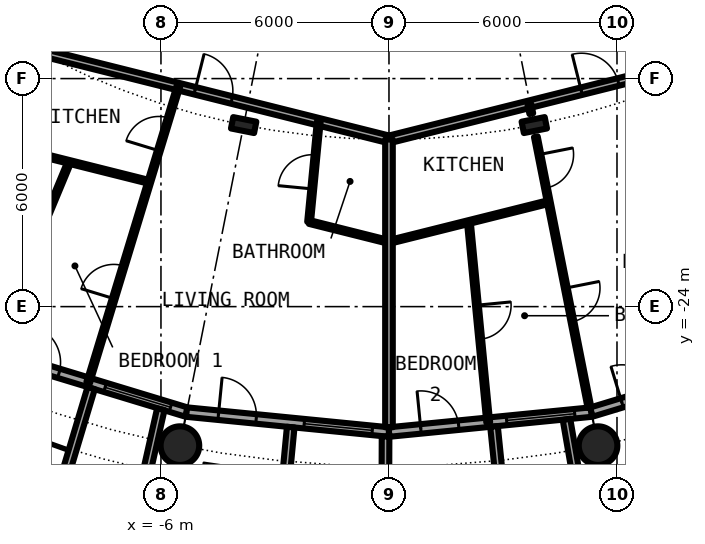
"""IFC4 building model, lengths in metres.
Left out: names, types, materials, properties, quantities, classifications, styles, units other than length and angle.
Written with IfcOpenShell. Run it as: python <this file> out.ifc"""

import sys

from ifc_helpers import new_model, si_unit, direction, frame, frame_2d, origin, origin_2d, place, context, subcontext, project, spatial, rectangle, hollow_circle, i_section, extrude, element, fill, save


model = new_model("IFC4")
c1 = context("Model", 3, precision=1e-05, world=origin(), true_north=direction((0.0, 1.0)))
c2 = subcontext(c1, "Body", "Model", "MODEL_VIEW")
j1 = project(units=[si_unit("LENGTHUNIT", "METRE"), si_unit("PLANEANGLEUNIT", "RADIAN")], contexts=[c1])
p1 = place(None, origin())
s1 = spatial("IfcSite", under=j1, at=p1, CompositionType="ELEMENT")
p2 = place(p1, origin())
s2 = spatial("IfcBuilding", under=s1, at=p2, CompositionType="ELEMENT")
p3 = place(p2, frame((0.0, 0.0, 31.95)))
s3 = spatial("IfcBuildingStorey", under=s2, at=p3, CompositionType="ELEMENT", Elevation=31.95)
for number, where, z_axis, x_axis in (
    (1, (-5.501, -27.658, 0.0), (0.0, 0.0, 1.0), (1.0, 0.0, 0.0)),
    (2, (5.501, -27.658, 0.0), (0.0, 0.0, 1.0), (1.0, 0.0, 0.0)),
):
    element("IfcColumn", number, at=place(p3, frame(where, z_axis=z_axis, x_axis=x_axis)), inside=s3, PredefinedType="COLUMN", context=c2, shape_type="SweptSolid", body=[
        extrude(hollow_circle(Radius=0.508, WallThickness=0.05, at=origin_2d()), origin(), (0.0, 0.0, 1.0), 3.05),
    ])
for number, where, z_axis, x_axis in (
    (3, (-3.824, -19.223, 0.0), (0.0, 0.0, 1.0), (-0.195, -0.981, 0.0)),
    (4, (3.824, -19.223, 0.0), (0.0, 0.0, 1.0), (0.195, -0.981, 0.0)),
):
    element("IfcColumn", number, at=place(p3, frame(where, z_axis=z_axis, x_axis=x_axis)), inside=s3, PredefinedType="COLUMN", context=c2, shape_type="SweptSolid", body=[
        extrude(i_section(OverallWidth=0.305, OverallDepth=0.62, WebThickness=0.021, FlangeThickness=0.04, FilletRadius=0.027, at=origin_2d()), origin(), (0.0, 0.0, 1.0), 3.05),
    ])
p4 = place(p3, frame((-10.447, -25.222, 0.0), z_axis=(0.0, 0.0, 1.0), x_axis=(0.956965678721, -0.290201119486, 0.0)))
e5 = element("IfcWall", 5, at=p4, inside=s3, PredefinedType="SOLIDWALL", context=c2, shape_type="SweptSolid", body=[
    extrude(rectangle(XDim=5.351, YDim=0.25, at=frame_2d((2.676, 0.0))), origin(), (0.0, 0.0, 1.0), 2.7),
])
p5 = place(p4, frame((0.841, 0.0, 0.0)))
e6 = element("IfcOpeningElement", 6, at=p5, cuts=e5, PredefinedType="OPENING", context=c2, shape_type="SweptSolid", body=[
    extrude(rectangle(XDim=1.0, YDim=2.2, at=frame_2d((0.5, 1.1))), frame((0.0, 0.135, 0.0), z_axis=(0.0, -1.0, 0.0), x_axis=(1.0, 0.0, 0.0)), (0.0, 0.0, 1.0), 0.27),
])
p6 = place(p4, frame((3.111, 0.0, 0.3)))
e7 = element("IfcOpeningElement", 7, at=p6, cuts=e5, PredefinedType="OPENING", context=c2, shape_type="SweptSolid", body=[
    extrude(rectangle(XDim=1.8, YDim=2.1, at=frame_2d((0.9, 1.05))), frame((0.0, 0.135, 0.0), z_axis=(0.0, -1.0, 0.0), x_axis=(1.0, 0.0, 0.0)), (0.0, 0.0, 1.0), 0.27),
])
p7 = place(p3, frame((-7.837, -26.144, -0.03), z_axis=(0.0, 0.0, 1.0), x_axis=(-0.287064767992, -0.957911174889, 0.0)))
e8 = element("IfcWall", 8, at=p7, inside=s3, PredefinedType="SOLIDWALL", context=c2, shape_type="SweptSolid", body=[
    extrude(rectangle(XDim=3.006, YDim=0.2, at=frame_2d((1.503, 0.0))), origin(), (0.0, 0.0, 1.0), 2.73),
])
p8 = place(p3, frame((-6.004, -26.7, -0.03), z_axis=(0.0, 0.0, 1.0), x_axis=(-0.219609259383, -0.975587911566, 0.0)))
e9 = element("IfcWall", 9, at=p8, inside=s3, PredefinedType="SOLIDWALL", context=c2, shape_type="SweptSolid", body=[
    extrude(rectangle(XDim=2.933, YDim=0.2, at=frame_2d((1.466, 0.0))), origin(), (0.0, 0.0, 1.0), 2.73),
])
p9 = place(p3, frame((-5.326, -26.775, 0.0), z_axis=(0.0, 0.0, 1.0), x_axis=(0.995173996315, -0.098126026407, 0.0)))
e10 = element("IfcWall", 10, at=p9, inside=s3, PredefinedType="SOLIDWALL", context=c2, shape_type="SweptSolid", body=[
    extrude(rectangle(XDim=5.352, YDim=0.25, at=frame_2d((2.676, 0.0))), origin(), (0.0, 0.0, 1.0), 2.7),
])
p10 = place(p9, frame((0.841, 0.0, 0.0)))
e11 = element("IfcOpeningElement", 11, at=p10, cuts=e10, PredefinedType="OPENING", context=c2, shape_type="SweptSolid", body=[
    extrude(rectangle(XDim=1.0, YDim=2.2, at=frame_2d((0.5, 1.1))), frame((0.0, 0.135, 0.0), z_axis=(0.0, -1.0, 0.0), x_axis=(1.0, 0.0, 0.0)), (0.0, 0.0, 1.0), 0.27),
])
p11 = place(p9, frame((3.111, 0.0, 0.3)))
e12 = element("IfcOpeningElement", 12, at=p11, cuts=e10, PredefinedType="OPENING", context=c2, shape_type="SweptSolid", body=[
    extrude(rectangle(XDim=1.8, YDim=2.1, at=frame_2d((0.9, 1.05))), frame((0.0, 0.135, 0.0), z_axis=(0.0, -1.0, 0.0), x_axis=(1.0, 0.0, 0.0)), (0.0, 0.0, 1.0), 0.27),
])
p12 = place(p3, frame((-2.586, -27.171, -0.03), z_axis=(0.0, 0.0, 1.0), x_axis=(-0.094548432284, -0.995520262954, 0.0)))
e13 = element("IfcWall", 13, at=p12, inside=s3, PredefinedType="SOLIDWALL", context=c2, shape_type="SweptSolid", body=[
    extrude(rectangle(XDim=3.006, YDim=0.2, at=frame_2d((1.503, 0.0))), origin(), (0.0, 0.0, 1.0), 2.73),
])
p13 = place(p3, frame((-0.09, -27.417, -0.03), z_axis=(0.0, 0.0, 1.0), x_axis=(-0.00347308367, -0.999993968827, 0.0)))
e14 = element("IfcWall", 14, at=p13, inside=s3, PredefinedType="SOLIDWALL", context=c2, shape_type="SweptSolid", body=[
    extrude(rectangle(XDim=2.882, YDim=0.2, at=frame_2d((1.441, 0.0))), origin(), (0.0, 0.0, 1.0), 2.73),
])
p14 = place(p3, frame((0.0, -27.3, 0.0), z_axis=(0.0, 0.0, 1.0), x_axis=(0.995173996315, 0.098126026407, 0.0)))
e15 = element("IfcWall", 15, at=p14, inside=s3, PredefinedType="SOLIDWALL", context=c2, shape_type="SweptSolid", body=[
    extrude(rectangle(XDim=5.352, YDim=0.25, at=frame_2d((2.676, 0.0))), origin(), (0.0, 0.0, 1.0), 2.7),
])
p15 = place(p14, frame((0.841, 0.0, 0.0)))
e16 = element("IfcOpeningElement", 16, at=p15, cuts=e15, PredefinedType="OPENING", context=c2, shape_type="SweptSolid", body=[
    extrude(rectangle(XDim=1.0, YDim=2.2, at=frame_2d((0.5, 1.1))), frame((0.0, 0.135, 0.0), z_axis=(0.0, -1.0, 0.0), x_axis=(1.0, 0.0, 0.0)), (0.0, 0.0, 1.0), 0.27),
])
p16 = place(p14, frame((3.111, 0.0, 0.3)))
e17 = element("IfcOpeningElement", 17, at=p16, cuts=e15, PredefinedType="OPENING", context=c2, shape_type="SweptSolid", body=[
    extrude(rectangle(XDim=1.8, YDim=2.1, at=frame_2d((0.9, 1.05))), frame((0.0, 0.135, 0.0), z_axis=(0.0, -1.0, 0.0), x_axis=(1.0, 0.0, 0.0)), (0.0, 0.0, 1.0), 0.27),
])
p17 = place(p3, frame((2.764, -27.153, -0.03), z_axis=(0.0, 0.0, 1.0), x_axis=(0.101505487237, -0.994834979311, 0.0)))
e18 = element("IfcWall", 18, at=p17, inside=s3, PredefinedType="SOLIDWALL", context=c2, shape_type="SweptSolid", body=[
    extrude(rectangle(XDim=3.007, YDim=0.2, at=frame_2d((1.503, 0.0))), origin(), (0.0, 0.0, 1.0), 2.73),
])
p18 = place(p3, frame((4.671, -26.966, -0.03), z_axis=(0.0, 0.0, 1.0), x_axis=(0.170539878907, -0.985350774954, 0.0)))
e19 = element("IfcWall", 19, at=p18, inside=s3, PredefinedType="SOLIDWALL", context=c2, shape_type="SweptSolid", body=[
    extrude(rectangle(XDim=2.932, YDim=0.2, at=frame_2d((1.466, 0.0))), origin(), (0.0, 0.0, 1.0), 2.73),
])
p19 = place(p3, frame((5.326, -26.775, 0.0), z_axis=(0.0, 0.0, 1.0), x_axis=(0.956965678721, 0.290201119486, 0.0)))
e20 = element("IfcWall", 20, at=p19, inside=s3, PredefinedType="SOLIDWALL", context=c2, shape_type="SweptSolid", body=[
    extrude(rectangle(XDim=5.351, YDim=0.25, at=frame_2d((2.676, 0.0))), origin(), (0.0, 0.0, 1.0), 2.7),
])
p20 = place(p19, frame((0.841, 0.0, 0.0)))
e21 = element("IfcOpeningElement", 21, at=p20, cuts=e20, PredefinedType="OPENING", context=c2, shape_type="SweptSolid", body=[
    extrude(rectangle(XDim=1.0, YDim=2.2, at=frame_2d((0.5, 1.1))), frame((0.0, 0.135, 0.0), z_axis=(0.0, -1.0, 0.0), x_axis=(1.0, 0.0, 0.0)), (0.0, 0.0, 1.0), 0.27),
])
p21 = place(p19, frame((3.111, 0.0, 0.3)))
e22 = element("IfcOpeningElement", 22, at=p21, cuts=e20, PredefinedType="OPENING", context=c2, shape_type="SweptSolid", body=[
    extrude(rectangle(XDim=1.8, YDim=2.1, at=frame_2d((0.9, 1.05))), frame((0.0, 0.135, 0.0), z_axis=(0.0, -1.0, 0.0), x_axis=(1.0, 0.0, 0.0)), (0.0, 0.0, 1.0), 0.27),
])
p22 = place(p3, frame((-10.516, -19.666, 0.0), z_axis=(0.0, 0.0, 1.0), x_axis=(0.97005315629, -0.242892721118, 0.0)))
e23 = element("IfcWall", 23, at=p22, inside=s3, PredefinedType="PARTITIONING", context=c2, shape_type="SweptSolid", body=[
    extrude(rectangle(XDim=4.343, YDim=0.1, at=frame_2d((2.172, 0.0))), origin(), (0.0, 0.0, 1.0), 2.7),
])
p23 = place(p3, frame((-2.096, -21.774, 0.0), z_axis=(0.0, 0.0, 1.0), x_axis=(0.969969957613, -0.24322475476, 0.0)))
e24 = element("IfcWall", 24, at=p23, inside=s3, PredefinedType="PARTITIONING", context=c2, shape_type="SweptSolid", body=[
    extrude(rectangle(XDim=2.167, YDim=0.1, at=frame_2d((1.083, 0.0))), origin(), (0.0, 0.0, 1.0), 2.7),
])
p24 = place(p3, frame((-0.006, -22.301, 0.0), z_axis=(0.0, 0.0, 1.0), x_axis=(0.970106148391, 0.24268098577, 0.0)))
e25 = element("IfcWall", 25, at=p24, inside=s3, PredefinedType="PARTITIONING", context=c2, shape_type="SweptSolid", body=[
    extrude(rectangle(XDim=4.347, YDim=0.1, at=frame_2d((2.173, 0.0))), origin(), (0.0, 0.0, 1.0), 2.7),
])
p25 = place(p3, frame((-9.242, -17.284, 0.0), z_axis=(0.0, 0.0, 1.0), x_axis=(0.970002158938, -0.243096301198, 0.0)))
e26 = element("IfcWall", 26, at=p25, inside=s3, PredefinedType="PARTITIONING", context=c2, shape_type="SweptSolid", body=[
    extrude(rectangle(XDim=9.528, YDim=0.2, at=frame_2d((4.764, 0.0))), origin(), (0.0, 0.0, 1.0), 2.38),
])
p26 = place(p25, frame((4.262, 0.0, 0.0)))
e27 = element("IfcOpeningElement", 27, at=p26, cuts=e26, PredefinedType="OPENING", context=c2, shape_type="SweptSolid", body=[
    extrude(rectangle(XDim=1.0, YDim=2.3, at=frame_2d((0.5, 1.15))), frame((0.0, 0.11, 0.0), z_axis=(0.0, -1.0, 0.0), x_axis=(1.0, 0.0, 0.0)), (0.0, 0.0, 1.0), 0.22),
])
p27 = place(p3, frame((-0.001, -19.601, 0.0), z_axis=(0.0, 0.0, 1.0), x_axis=(0.970014215304, 0.243048188859, 0.0)))
e28 = element("IfcWall", 28, at=p27, inside=s3, PredefinedType="PARTITIONING", context=c2, shape_type="SweptSolid", body=[
    extrude(rectangle(XDim=9.526, YDim=0.2, at=frame_2d((4.763, 0.0))), origin(), (0.0, 0.0, 1.0), 2.38),
])
p28 = place(p27, frame((5.221, 0.0, 0.0)))
e29 = element("IfcOpeningElement", 29, at=p28, cuts=e28, PredefinedType="OPENING", context=c2, shape_type="SweptSolid", body=[
    extrude(rectangle(XDim=1.0, YDim=2.3, at=frame_2d((0.5, 1.15))), frame((0.0, 0.11, 0.0), z_axis=(0.0, -1.0, 0.0), x_axis=(1.0, 0.0, 0.0)), (0.0, 0.0, 1.0), 0.22),
])
p29 = place(p3, frame((-10.447, -25.086, 0.0), z_axis=(0.0, 0.0, 1.0), x_axis=(0.384363513821, 0.923181828917, 0.0)))
e30 = element("IfcWall", 30, at=p29, inside=s3, PredefinedType="PARTITIONING", context=c2, shape_type="SweptSolid", body=[
    extrude(rectangle(XDim=5.3, YDim=0.1, at=frame_2d((2.65, 0.0))), origin(), (0.0, 0.0, 1.0), 2.7),
])
p30 = place(p29, frame((2.2, 0.0, 0.0)))
e31 = element("IfcOpeningElement", 31, at=p30, cuts=e30, PredefinedType="OPENING", context=c2, shape_type="SweptSolid", body=[
    extrude(rectangle(XDim=0.9, YDim=2.3, at=frame_2d((0.45, 1.15))), frame((0.0, 0.06, 0.0), z_axis=(0.0, -1.0, 0.0), x_axis=(1.0, 0.0, 0.0)), (0.0, 0.0, 1.0), 0.12),
])
p31 = place(p3, frame((-7.914, -25.997, 0.0), z_axis=(0.0, 0.0, 1.0), x_axis=(0.291319167605, 0.956625915698, 0.0)))
e32 = element("IfcWall", 32, at=p31, inside=s3, PredefinedType="PARTITIONING", context=c2, shape_type="SweptSolid", body=[
    extrude(rectangle(XDim=8.139, YDim=0.1, at=frame_2d((4.07, 0.0))), origin(), (0.0, 0.0, 1.0), 2.7),
])
p32 = place(p31, frame((6.377, 0.0, 0.0)))
e33 = element("IfcOpeningElement", 33, at=p32, cuts=e32, PredefinedType="OPENING", context=c2, shape_type="SweptSolid", body=[
    extrude(rectangle(XDim=0.9, YDim=2.3, at=frame_2d((0.45, 1.15))), frame((0.0, 0.06, 0.0), z_axis=(0.0, -1.0, 0.0), x_axis=(1.0, 0.0, 0.0)), (0.0, 0.0, 1.0), 0.12),
])
p33 = place(p31, frame((2.308, 0.0, 0.0)))
e34 = element("IfcOpeningElement", 34, at=p33, cuts=e32, PredefinedType="OPENING", context=c2, shape_type="SweptSolid", body=[
    extrude(rectangle(XDim=0.9, YDim=2.3, at=frame_2d((0.45, 1.15))), frame((0.0, 0.06, 0.0), z_axis=(0.0, -1.0, 0.0), x_axis=(1.0, 0.0, 0.0)), (0.0, 0.0, 1.0), 0.12),
])
p34 = place(p3, frame((-2.102, -21.773, 0.0), z_axis=(0.0, 0.0, 1.0), x_axis=(0.095970632278, 0.995384165908, 0.0)))
e35 = element("IfcWall", 35, at=p34, inside=s3, PredefinedType="PARTITIONING", context=c2, shape_type="SweptSolid", body=[
    extrude(rectangle(XDim=2.648, YDim=0.1, at=frame_2d((1.324, 0.0))), origin(), (0.0, 0.0, 1.0), 2.7),
])
p35 = place(p34, frame((0.874, 0.0, 0.0)))
e36 = element("IfcOpeningElement", 36, at=p35, cuts=e35, PredefinedType="OPENING", context=c2, shape_type="SweptSolid", body=[
    extrude(rectangle(XDim=0.9, YDim=2.3, at=frame_2d((0.45, 1.15))), frame((0.0, 0.06, 0.0), z_axis=(0.0, -1.0, 0.0), x_axis=(1.0, 0.0, 0.0)), (0.0, 0.0, 1.0), 0.12),
])
p36 = place(p3, frame((0.0, -27.175, 0.0), z_axis=(0.0, 0.0, 1.0), x_axis=(0.0, 1.0, 0.0)))
e37 = element("IfcWall", 37, at=p36, inside=s3, PredefinedType="PARTITIONING", context=c2, shape_type="SweptSolid", body=[
    extrude(rectangle(XDim=7.575, YDim=0.2, at=frame_2d((3.788, 0.0))), origin(), (0.0, 0.0, 1.0), 2.7),
])
p37 = place(p3, frame((2.102, -21.773, 0.0), z_axis=(0.0, 0.0, 1.0), x_axis=(0.096215269366, -0.995360548716, 0.0)))
e38 = element("IfcWall", 38, at=p37, inside=s3, PredefinedType="PARTITIONING", context=c2, shape_type="SweptSolid", body=[
    extrude(rectangle(XDim=5.301, YDim=0.1, at=frame_2d((2.65, 0.0))), origin(), (0.0, 0.0, 1.0), 2.7),
])
p38 = place(p37, frame((2.2, 0.0, 0.0)))
e39 = element("IfcOpeningElement", 39, at=p38, cuts=e38, PredefinedType="OPENING", context=c2, shape_type="SweptSolid", body=[
    extrude(rectangle(XDim=0.9, YDim=2.3, at=frame_2d((0.45, 1.15))), frame((0.0, 0.06, 0.0), z_axis=(0.0, -1.0, 0.0), x_axis=(1.0, 0.0, 0.0)), (0.0, 0.0, 1.0), 0.12),
])
p39 = place(p3, frame((3.695, -18.674, 0.0), z_axis=(0.0, 0.0, 1.0), x_axis=(0.197040251839, -0.980395399395, 0.0)))
e40 = element("IfcWall", 40, at=p39, inside=s3, PredefinedType="PARTITIONING", context=c2, shape_type="SweptSolid", body=[
    extrude(rectangle(XDim=0.254, YDim=0.1, at=frame_2d((0.127, 0.0))), origin(), (0.0, 0.0, 1.0), 2.7),
])
p40 = place(p3, frame((3.865, -19.531, 0.0), z_axis=(0.0, 0.0, 1.0), x_axis=(0.194196464481, -0.980962656365, 0.0)))
e41 = element("IfcWall", 41, at=p40, inside=s3, PredefinedType="PARTITIONING", context=c2, shape_type="SweptSolid", body=[
    extrude(rectangle(XDim=7.265, YDim=0.1, at=frame_2d((3.633, 0.0))), origin(), (0.0, 0.0, 1.0), 2.7),
])
p41 = place(p40, frame((0.476, 0.0, 0.0)))
e42 = element("IfcOpeningElement", 42, at=p41, cuts=e41, PredefinedType="OPENING", context=c2, shape_type="SweptSolid", body=[
    extrude(rectangle(XDim=0.9, YDim=2.3, at=frame_2d((0.45, 1.15))), frame((0.0, 0.06, 0.0), z_axis=(0.0, -1.0, 0.0), x_axis=(1.0, 0.0, 0.0)), (0.0, 0.0, 1.0), 0.12),
])
p42 = place(p40, frame((4.058, 0.0, 0.0)))
e43 = element("IfcOpeningElement", 43, at=p42, cuts=e41, PredefinedType="OPENING", context=c2, shape_type="SweptSolid", body=[
    extrude(rectangle(XDim=0.9, YDim=2.3, at=frame_2d((0.45, 1.15))), frame((0.0, 0.06, 0.0), z_axis=(0.0, -1.0, 0.0), x_axis=(1.0, 0.0, 0.0)), (0.0, 0.0, 1.0), 0.12),
])
p43 = place(p5, origin())
e44 = element("IfcDoor", 44, at=p43, inside=s3, OperationType="SINGLE_SWING_LEFT", PredefinedType="DOOR", context=c2, shape_type="SweptSolid", body=[
    extrude(rectangle(XDim=1.0, YDim=2.2, at=frame_2d((0.5, 1.1))), frame((0.0, 0.025, 0.0), z_axis=(0.0, -1.0, 0.0), x_axis=(1.0, 0.0, 0.0)), (0.0, 0.0, 1.0), 0.05),
])
fill(e6, e44)
p44 = place(p6, origin())
e45 = element("IfcWindow", 45, at=p44, inside=s3, PartitioningType="SINGLE_PANEL", PredefinedType="WINDOW", context=c2, shape_type="SweptSolid", body=[
    extrude(rectangle(XDim=1.8, YDim=2.1, at=frame_2d((0.9, 1.05))), frame((0.0, 0.03, 0.0), z_axis=(0.0, -1.0, 0.0), x_axis=(1.0, 0.0, 0.0)), (0.0, 0.0, 1.0), 0.06),
])
fill(e7, e45)
p45 = place(p10, origin())
e46 = element("IfcDoor", 46, at=p45, inside=s3, OperationType="SINGLE_SWING_LEFT", PredefinedType="DOOR", context=c2, shape_type="SweptSolid", body=[
    extrude(rectangle(XDim=1.0, YDim=2.2, at=frame_2d((0.5, 1.1))), frame((0.0, 0.025, 0.0), z_axis=(0.0, -1.0, 0.0), x_axis=(1.0, 0.0, 0.0)), (0.0, 0.0, 1.0), 0.05),
])
fill(e11, e46)
p46 = place(p11, origin())
e47 = element("IfcWindow", 47, at=p46, inside=s3, PartitioningType="SINGLE_PANEL", PredefinedType="WINDOW", context=c2, shape_type="SweptSolid", body=[
    extrude(rectangle(XDim=1.8, YDim=2.1, at=frame_2d((0.9, 1.05))), frame((0.0, 0.03, 0.0), z_axis=(0.0, -1.0, 0.0), x_axis=(1.0, 0.0, 0.0)), (0.0, 0.0, 1.0), 0.06),
])
fill(e12, e47)
p47 = place(p15, origin())
e48 = element("IfcDoor", 48, at=p47, inside=s3, OperationType="SINGLE_SWING_LEFT", PredefinedType="DOOR", context=c2, shape_type="SweptSolid", body=[
    extrude(rectangle(XDim=1.0, YDim=2.2, at=frame_2d((0.5, 1.1))), frame((0.0, 0.025, 0.0), z_axis=(0.0, -1.0, 0.0), x_axis=(1.0, 0.0, 0.0)), (0.0, 0.0, 1.0), 0.05),
])
fill(e16, e48)
p48 = place(p16, origin())
e49 = element("IfcWindow", 49, at=p48, inside=s3, PartitioningType="SINGLE_PANEL", PredefinedType="WINDOW", context=c2, shape_type="SweptSolid", body=[
    extrude(rectangle(XDim=1.8, YDim=2.1, at=frame_2d((0.9, 1.05))), frame((0.0, 0.03, 0.0), z_axis=(0.0, -1.0, 0.0), x_axis=(1.0, 0.0, 0.0)), (0.0, 0.0, 1.0), 0.06),
])
fill(e17, e49)
p49 = place(p20, origin())
e50 = element("IfcDoor", 50, at=p49, inside=s3, OperationType="SINGLE_SWING_LEFT", PredefinedType="DOOR", context=c2, shape_type="SweptSolid", body=[
    extrude(rectangle(XDim=1.0, YDim=2.2, at=frame_2d((0.5, 1.1))), frame((0.0, 0.025, 0.0), z_axis=(0.0, -1.0, 0.0), x_axis=(1.0, 0.0, 0.0)), (0.0, 0.0, 1.0), 0.05),
])
fill(e21, e50)
p50 = place(p26, origin())
e51 = element("IfcDoor", 51, at=p50, inside=s3, OperationType="SINGLE_SWING_LEFT", PredefinedType="DOOR", context=c2, shape_type="SweptSolid", body=[
    extrude(rectangle(XDim=1.0, YDim=2.3, at=frame_2d((0.5, 1.15))), frame((0.0, 0.025, 0.0), z_axis=(0.0, -1.0, 0.0), x_axis=(1.0, 0.0, 0.0)), (0.0, 0.0, 1.0), 0.05),
])
fill(e27, e51)
p51 = place(p35, origin())
e52 = element("IfcDoor", 52, at=p51, inside=s3, OperationType="SINGLE_SWING_RIGHT", PredefinedType="DOOR", context=c2, shape_type="SweptSolid", body=[
    extrude(rectangle(XDim=0.9, YDim=2.3, at=frame_2d((0.45, 1.15))), frame((0.0, 0.025, 0.0), z_axis=(0.0, -1.0, 0.0), x_axis=(1.0, 0.0, 0.0)), (0.0, 0.0, 1.0), 0.05),
])
fill(e36, e52)
p52 = place(p32, origin())
e53 = element("IfcDoor", 53, at=p52, inside=s3, OperationType="SINGLE_SWING_RIGHT", PredefinedType="DOOR", context=c2, shape_type="SweptSolid", body=[
    extrude(rectangle(XDim=0.9, YDim=2.3, at=frame_2d((0.45, 1.15))), frame((0.0, 0.025, 0.0), z_axis=(0.0, -1.0, 0.0), x_axis=(1.0, 0.0, 0.0)), (0.0, 0.0, 1.0), 0.05),
])
fill(e33, e53)
p53 = place(p33, origin())
e54 = element("IfcDoor", 54, at=p53, inside=s3, OperationType="SINGLE_SWING_LEFT", PredefinedType="DOOR", context=c2, shape_type="SweptSolid", body=[
    extrude(rectangle(XDim=0.9, YDim=2.3, at=frame_2d((0.45, 1.15))), frame((0.0, 0.025, 0.0), z_axis=(0.0, -1.0, 0.0), x_axis=(1.0, 0.0, 0.0)), (0.0, 0.0, 1.0), 0.05),
])
fill(e34, e54)
p54 = place(p28, origin())
e55 = element("IfcDoor", 55, at=p54, inside=s3, OperationType="SINGLE_SWING_RIGHT", PredefinedType="DOOR", context=c2, shape_type="SweptSolid", body=[
    extrude(rectangle(XDim=1.0, YDim=2.3, at=frame_2d((0.5, 1.15))), frame((0.0, 0.025, 0.0), z_axis=(0.0, -1.0, 0.0), x_axis=(1.0, 0.0, 0.0)), (0.0, 0.0, 1.0), 0.05),
])
fill(e29, e55)
p55 = place(p41, origin())
e56 = element("IfcDoor", 56, at=p55, inside=s3, OperationType="SINGLE_SWING_LEFT", PredefinedType="DOOR", context=c2, shape_type="SweptSolid", body=[
    extrude(rectangle(XDim=0.9, YDim=2.3, at=frame_2d((0.45, 1.15))), frame((0.0, 0.025, 0.0), z_axis=(0.0, -1.0, 0.0), x_axis=(1.0, 0.0, 0.0)), (0.0, 0.0, 1.0), 0.05),
])
fill(e42, e56)
p56 = place(p42, origin())
e57 = element("IfcDoor", 57, at=p56, inside=s3, OperationType="SINGLE_SWING_RIGHT", PredefinedType="DOOR", context=c2, shape_type="SweptSolid", body=[
    extrude(rectangle(XDim=0.9, YDim=2.3, at=frame_2d((0.45, 1.15))), frame((0.0, 0.025, 0.0), z_axis=(0.0, -1.0, 0.0), x_axis=(1.0, 0.0, 0.0)), (0.0, 0.0, 1.0), 0.05),
])
fill(e43, e57)
p57 = place(p38, origin())
e58 = element("IfcDoor", 58, at=p57, inside=s3, OperationType="SINGLE_SWING_RIGHT", PredefinedType="DOOR", context=c2, shape_type="SweptSolid", body=[
    extrude(rectangle(XDim=0.9, YDim=2.3, at=frame_2d((0.45, 1.15))), frame((0.0, 0.025, 0.0), z_axis=(0.0, -1.0, 0.0), x_axis=(1.0, 0.0, 0.0)), (0.0, 0.0, 1.0), 0.05),
])
fill(e39, e58)
save(model, sys.argv[1])
